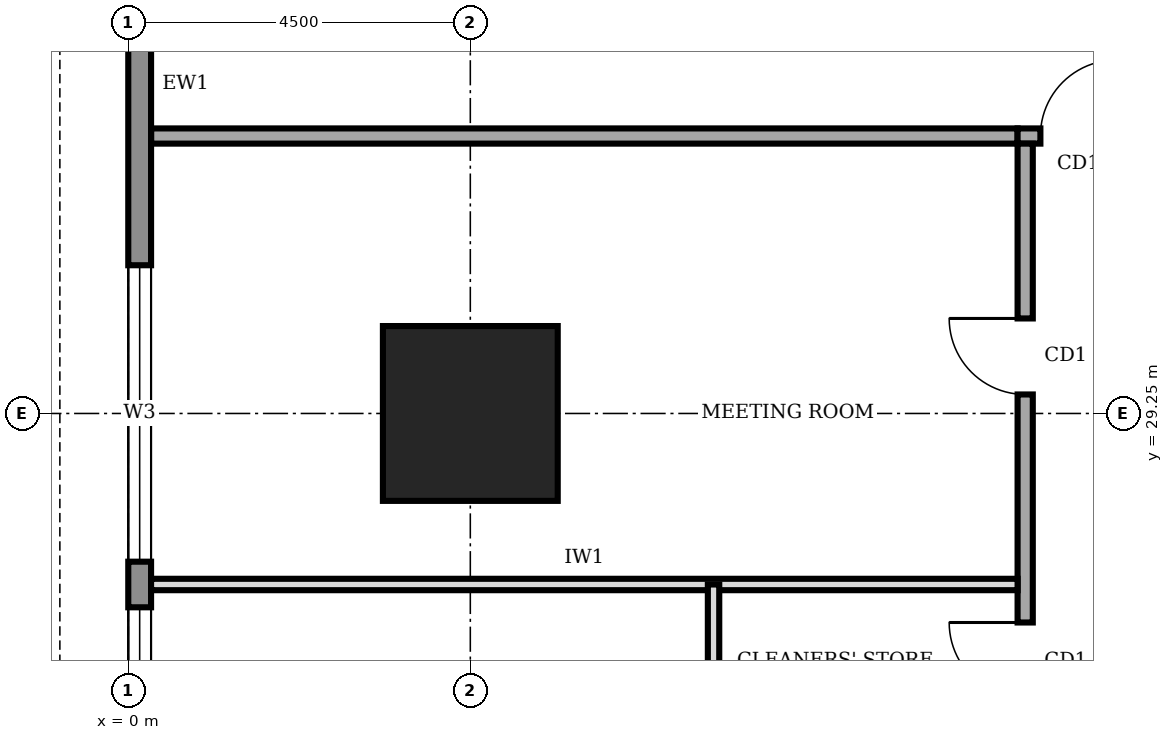
"""IFC4 building model, lengths in metres.
Left out: names, types, materials, properties, quantities, classifications, styles, units other than length and angle.
Written with IfcOpenShell. Run it as: python <this file> out.ifc"""

import sys

from ifc_helpers import new_model, si_unit, direction, frame, frame_2d, origin, origin_2d, place, context, subcontext, project, spatial, rectangle, extrude, element, fill, save


model = new_model("IFC4")
c1 = context("Model", 3, precision=1e-05, world=origin(), true_north=direction((0.0, 1.0)))
c2 = subcontext(c1, "Body", "Model", "MODEL_VIEW")
j1 = project(units=[si_unit("LENGTHUNIT", "METRE"), si_unit("PLANEANGLEUNIT", "RADIAN")], contexts=[c1])
p1 = place(None, origin())
s1 = spatial("IfcSite", under=j1, at=p1, CompositionType="ELEMENT")
p2 = place(p1, origin())
s2 = spatial("IfcBuilding", under=s1, at=p2, CompositionType="ELEMENT")
p3 = place(p2, frame((0.0, 0.0, 85.0)))
s3 = spatial("IfcBuildingStorey", under=s2, at=p3, CompositionType="ELEMENT", Elevation=85.0)
p4 = place(p3, frame((4.5, 29.25, 0.0), z_axis=(0.0, 0.0, 1.0), x_axis=(1.0, 0.0, 0.0)))
e1 = element("IfcColumn", 1, at=p4, inside=s3, PredefinedType="COLUMN", context=c2, shape_type="SweptSolid", body=[
    extrude(rectangle(XDim=2.3, YDim=2.3, at=origin_2d()), origin(), (0.0, 0.0, 1.0), 4.0),
])
p5 = place(p3, frame((0.15, 35.98, 0.0), z_axis=(0.0, 0.0, 1.0), x_axis=(0.0, -1.0, 0.0)))
e2 = element("IfcWall", 2, at=p5, inside=s3, PredefinedType="STANDARD", context=c2, shape_type="SweptSolid", body=[
    extrude(rectangle(XDim=31.46, YDim=0.3, at=frame_2d((15.73, 0.0))), origin(), (0.0, 0.0, 1.0), 3.75),
])
p6 = place(p5, frame((27.28, 0.0, 0.95)))
e3 = element("IfcOpeningElement", 3, at=p6, cuts=e2, PredefinedType="OPENING", context=c2, shape_type="SweptSolid", body=[
    extrude(rectangle(XDim=3.9, YDim=1.8, at=frame_2d((1.95, 0.9))), frame((0.0, 0.16, 0.0), z_axis=(0.0, -1.0, 0.0), x_axis=(1.0, 0.0, 0.0)), (0.0, 0.0, 1.0), 0.32),
])
p7 = place(p5, frame((22.78, 0.0, 0.95)))
e4 = element("IfcOpeningElement", 4, at=p7, cuts=e2, PredefinedType="OPENING", context=c2, shape_type="SweptSolid", body=[
    extrude(rectangle(XDim=3.9, YDim=1.8, at=frame_2d((1.95, 0.9))), frame((0.0, 0.16, 0.0), z_axis=(0.0, -1.0, 0.0), x_axis=(1.0, 0.0, 0.0)), (0.0, 0.0, 1.0), 0.32),
])
p8 = place(p5, frame((18.28, 0.0, 0.95)))
e5 = element("IfcOpeningElement", 5, at=p8, cuts=e2, PredefinedType="OPENING", context=c2, shape_type="SweptSolid", body=[
    extrude(rectangle(XDim=3.9, YDim=1.8, at=frame_2d((1.95, 0.9))), frame((0.0, 0.16, 0.0), z_axis=(0.0, -1.0, 0.0), x_axis=(1.0, 0.0, 0.0)), (0.0, 0.0, 1.0), 0.32),
])
p9 = place(p5, frame((13.78, 0.0, 0.95)))
e6 = element("IfcOpeningElement", 6, at=p9, cuts=e2, PredefinedType="OPENING", context=c2, shape_type="SweptSolid", body=[
    extrude(rectangle(XDim=3.9, YDim=1.8, at=frame_2d((1.95, 0.9))), frame((0.0, 0.16, 0.0), z_axis=(0.0, -1.0, 0.0), x_axis=(1.0, 0.0, 0.0)), (0.0, 0.0, 1.0), 0.32),
])
p10 = place(p5, frame((9.28, 0.0, 0.95)))
e7 = element("IfcOpeningElement", 7, at=p10, cuts=e2, PredefinedType="OPENING", context=c2, shape_type="SweptSolid", body=[
    extrude(rectangle(XDim=3.9, YDim=1.8, at=frame_2d((1.95, 0.9))), frame((0.0, 0.16, 0.0), z_axis=(0.0, -1.0, 0.0), x_axis=(1.0, 0.0, 0.0)), (0.0, 0.0, 1.0), 0.32),
])
p11 = place(p5, frame((4.78, 0.0, 0.95)))
e8 = element("IfcOpeningElement", 8, at=p11, cuts=e2, PredefinedType="OPENING", context=c2, shape_type="SweptSolid", body=[
    extrude(rectangle(XDim=3.9, YDim=1.8, at=frame_2d((1.95, 0.9))), frame((0.0, 0.16, 0.0), z_axis=(0.0, -1.0, 0.0), x_axis=(1.0, 0.0, 0.0)), (0.0, 0.0, 1.0), 0.32),
])
p12 = place(p3, frame((40.2, 32.9, 0.0), z_axis=(0.0, 0.0, 1.0), x_axis=(-1.0, 0.0, 0.0)))
e9 = element("IfcWall", 9, at=p12, inside=s3, PredefinedType="SOLIDWALL", context=c2, shape_type="SweptSolid", body=[
    extrude(rectangle(XDim=28.5, YDim=0.2, at=frame_2d((14.25, 0.0))), origin(), (0.0, 0.0, 1.0), 3.75),
])
p13 = place(p12, frame((27.2, 0.0, 0.0)))
e10 = element("IfcOpeningElement", 10, at=p13, cuts=e9, PredefinedType="OPENING", context=c2, shape_type="SweptSolid", body=[
    extrude(rectangle(XDim=1.0, YDim=2.1, at=frame_2d((0.5, 1.05))), frame((0.0, 0.11, 0.0), z_axis=(0.0, -1.0, 0.0), x_axis=(1.0, 0.0, 0.0)), (0.0, 0.0, 1.0), 0.22),
])
p14 = place(p12, frame((23.95, 0.0, 0.0)))
e11 = element("IfcOpeningElement", 11, at=p14, cuts=e9, PredefinedType="OPENING", context=c2, shape_type="SweptSolid", body=[
    extrude(rectangle(XDim=1.0, YDim=2.1, at=frame_2d((0.5, 1.05))), frame((0.0, 0.11, 0.0), z_axis=(0.0, -1.0, 0.0), x_axis=(1.0, 0.0, 0.0)), (0.0, 0.0, 1.0), 0.22),
])
p15 = place(p12, frame((17.2, 0.0, 0.0)))
e12 = element("IfcOpeningElement", 12, at=p15, cuts=e9, PredefinedType="OPENING", context=c2, shape_type="SweptSolid", body=[
    extrude(rectangle(XDim=1.0, YDim=2.1, at=frame_2d((0.5, 1.05))), frame((0.0, 0.11, 0.0), z_axis=(0.0, -1.0, 0.0), x_axis=(1.0, 0.0, 0.0)), (0.0, 0.0, 1.0), 0.22),
])
p16 = place(p12, frame((6.0, 0.0, 0.0)))
e13 = element("IfcOpeningElement", 13, at=p16, cuts=e9, PredefinedType="OPENING", context=c2, shape_type="SweptSolid", body=[
    extrude(rectangle(XDim=1.0, YDim=2.1, at=frame_2d((0.5, 1.05))), frame((0.0, 0.11, 0.0), z_axis=(0.0, -1.0, 0.0), x_axis=(1.0, 0.0, 0.0)), (0.0, 0.0, 1.0), 0.22),
])
p17 = place(p3, frame((11.8, 32.8, 0.0), z_axis=(0.0, 0.0, 1.0), x_axis=(0.0, -1.0, 0.0)))
e14 = element("IfcWall", 14, at=p17, inside=s3, PredefinedType="SOLIDWALL", context=c2, shape_type="SweptSolid", body=[
    extrude(rectangle(XDim=25.3, YDim=0.2, at=frame_2d((12.65, 0.0))), origin(), (0.0, 0.0, 1.0), 3.75),
])
p18 = place(p17, frame((21.8, 0.0, 0.0)))
e15 = element("IfcOpeningElement", 15, at=p18, cuts=e14, PredefinedType="OPENING", context=c2, shape_type="SweptSolid", body=[
    extrude(rectangle(XDim=1.0, YDim=2.1, at=frame_2d((0.5, 1.05))), frame((0.0, 0.11, 0.0), z_axis=(0.0, -1.0, 0.0), x_axis=(1.0, 0.0, 0.0)), (0.0, 0.0, 1.0), 0.22),
])
p19 = place(p17, frame((17.15, 0.0, 0.0)))
e16 = element("IfcOpeningElement", 16, at=p19, cuts=e14, PredefinedType="OPENING", context=c2, shape_type="SweptSolid", body=[
    extrude(rectangle(XDim=0.9, YDim=2.1, at=frame_2d((0.45, 1.05))), frame((0.0, 0.11, 0.0), z_axis=(0.0, -1.0, 0.0), x_axis=(1.0, 0.0, 0.0)), (0.0, 0.0, 1.0), 0.22),
])
p20 = place(p17, frame((12.35, 0.0, 0.0)))
e17 = element("IfcOpeningElement", 17, at=p20, cuts=e14, PredefinedType="OPENING", context=c2, shape_type="SweptSolid", body=[
    extrude(rectangle(XDim=0.9, YDim=2.1, at=frame_2d((0.45, 1.05))), frame((0.0, 0.11, 0.0), z_axis=(0.0, -1.0, 0.0), x_axis=(1.0, 0.0, 0.0)), (0.0, 0.0, 1.0), 0.22),
])
p21 = place(p17, frame((9.3, 0.0, 0.0)))
e18 = element("IfcOpeningElement", 18, at=p21, cuts=e14, PredefinedType="OPENING", context=c2, shape_type="SweptSolid", body=[
    extrude(rectangle(XDim=0.9, YDim=2.1, at=frame_2d((0.45, 1.05))), frame((0.0, 0.11, 0.0), z_axis=(0.0, -1.0, 0.0), x_axis=(1.0, 0.0, 0.0)), (0.0, 0.0, 1.0), 0.22),
])
p22 = place(p17, frame((6.3, 0.0, 0.0)))
e19 = element("IfcOpeningElement", 19, at=p22, cuts=e14, PredefinedType="OPENING", context=c2, shape_type="SweptSolid", body=[
    extrude(rectangle(XDim=1.0, YDim=2.1, at=frame_2d((0.5, 1.05))), frame((0.0, 0.11, 0.0), z_axis=(0.0, -1.0, 0.0), x_axis=(1.0, 0.0, 0.0)), (0.0, 0.0, 1.0), 0.22),
])
p23 = place(p17, frame((14.4, 0.0, 0.0)))
e20 = element("IfcOpeningElement", 20, at=p23, cuts=e14, PredefinedType="OPENING", context=c2, shape_type="SweptSolid", body=[
    extrude(rectangle(XDim=1.0, YDim=2.1, at=frame_2d((0.5, 1.05))), frame((0.0, 0.11, 0.0), z_axis=(0.0, -1.0, 0.0), x_axis=(1.0, 0.0, 0.0)), (0.0, 0.0, 1.0), 0.22),
])
p24 = place(p17, frame((2.3, 0.0, 0.0)))
e21 = element("IfcOpeningElement", 21, at=p24, cuts=e14, PredefinedType="OPENING", context=c2, shape_type="SweptSolid", body=[
    extrude(rectangle(XDim=1.0, YDim=2.1, at=frame_2d((0.5, 1.05))), frame((0.0, 0.11, 0.0), z_axis=(0.0, -1.0, 0.0), x_axis=(1.0, 0.0, 0.0)), (0.0, 0.0, 1.0), 0.22),
])
p25 = place(p3, frame((0.3, 32.9, 0.0), z_axis=(0.0, 0.0, 1.0), x_axis=(1.0, 0.0, 0.0)))
e22 = element("IfcWall", 22, at=p25, inside=s3, PredefinedType="SOLIDWALL", context=c2, shape_type="SweptSolid", body=[
    extrude(rectangle(XDim=11.4, YDim=0.2, at=frame_2d((5.7, 0.0))), origin(), (0.0, 0.0, 1.0), 3.75),
])
p26 = place(p3, frame((0.3, 27.0, 0.0), z_axis=(0.0, 0.0, 1.0), x_axis=(1.0, 0.0, 0.0)))
e23 = element("IfcWall", 23, at=p26, inside=s3, PredefinedType="PARTITIONING", context=c2, shape_type="SweptSolid", body=[
    extrude(rectangle(XDim=11.4, YDim=0.15, at=frame_2d((5.7, 0.0))), origin(), (0.0, 0.0, 1.0), 3.75),
])
p27 = place(p3, frame((7.7, 25.0, 0.0), z_axis=(0.0, 0.0, 1.0), x_axis=(0.0, 1.0, 0.0)))
e24 = element("IfcWall", 24, at=p27, inside=s3, PredefinedType="PARTITIONING", context=c2, shape_type="SweptSolid", body=[
    extrude(rectangle(XDim=2.0, YDim=0.15, at=frame_2d((1.0, 0.0))), origin(), (0.0, 0.0, 1.0), 3.75),
])
p28 = place(p10, origin())
e25 = element("IfcWindow", 25, at=p28, inside=s3, PartitioningType="SINGLE_PANEL", PredefinedType="WINDOW", context=c2, shape_type="SweptSolid", body=[
    extrude(rectangle(XDim=3.9, YDim=1.8, at=frame_2d((1.95, 0.9))), frame((0.0, 0.03, 0.0), z_axis=(0.0, -1.0, 0.0), x_axis=(1.0, 0.0, 0.0)), (0.0, 0.0, 1.0), 0.06),
])
fill(e7, e25)
p29 = place(p11, origin())
e26 = element("IfcWindow", 26, at=p29, inside=s3, PartitioningType="SINGLE_PANEL", PredefinedType="WINDOW", context=c2, shape_type="SweptSolid", body=[
    extrude(rectangle(XDim=3.9, YDim=1.8, at=frame_2d((1.95, 0.9))), frame((0.0, 0.03, 0.0), z_axis=(0.0, -1.0, 0.0), x_axis=(1.0, 0.0, 0.0)), (0.0, 0.0, 1.0), 0.06),
])
fill(e8, e26)
p30 = place(p13, frame((1.0, 0.0, 0.0), z_axis=(0.0, 0.0, 1.0), x_axis=(-1.0, 0.0, 0.0)))
e27 = element("IfcDoor", 27, at=p30, inside=s3, OperationType="SINGLE_SWING_RIGHT", PredefinedType="DOOR", context=c2, shape_type="SweptSolid", body=[
    extrude(rectangle(XDim=1.0, YDim=2.1, at=frame_2d((0.5, 1.05))), frame((0.0, 0.025, 0.0), z_axis=(0.0, -1.0, 0.0), x_axis=(1.0, 0.0, 0.0)), (0.0, 0.0, 1.0), 0.05),
])
fill(e10, e27)
p31 = place(p22, frame((1.0, 0.0, 0.0), z_axis=(0.0, 0.0, 1.0), x_axis=(-1.0, 0.0, 0.0)))
e28 = element("IfcDoor", 28, at=p31, inside=s3, OperationType="SINGLE_SWING_RIGHT", PredefinedType="DOOR", context=c2, shape_type="SweptSolid", body=[
    extrude(rectangle(XDim=1.0, YDim=2.1, at=frame_2d((0.5, 1.05))), frame((0.0, 0.025, 0.0), z_axis=(0.0, -1.0, 0.0), x_axis=(1.0, 0.0, 0.0)), (0.0, 0.0, 1.0), 0.05),
])
fill(e19, e28)
p32 = place(p24, frame((1.0, 0.0, 0.0), z_axis=(0.0, 0.0, 1.0), x_axis=(-1.0, 0.0, 0.0)))
e29 = element("IfcDoor", 29, at=p32, inside=s3, OperationType="SINGLE_SWING_RIGHT", PredefinedType="DOOR", context=c2, shape_type="SweptSolid", body=[
    extrude(rectangle(XDim=1.0, YDim=2.1, at=frame_2d((0.5, 1.05))), frame((0.0, 0.025, 0.0), z_axis=(0.0, -1.0, 0.0), x_axis=(1.0, 0.0, 0.0)), (0.0, 0.0, 1.0), 0.05),
])
fill(e21, e29)
save(model, sys.argv[1])
